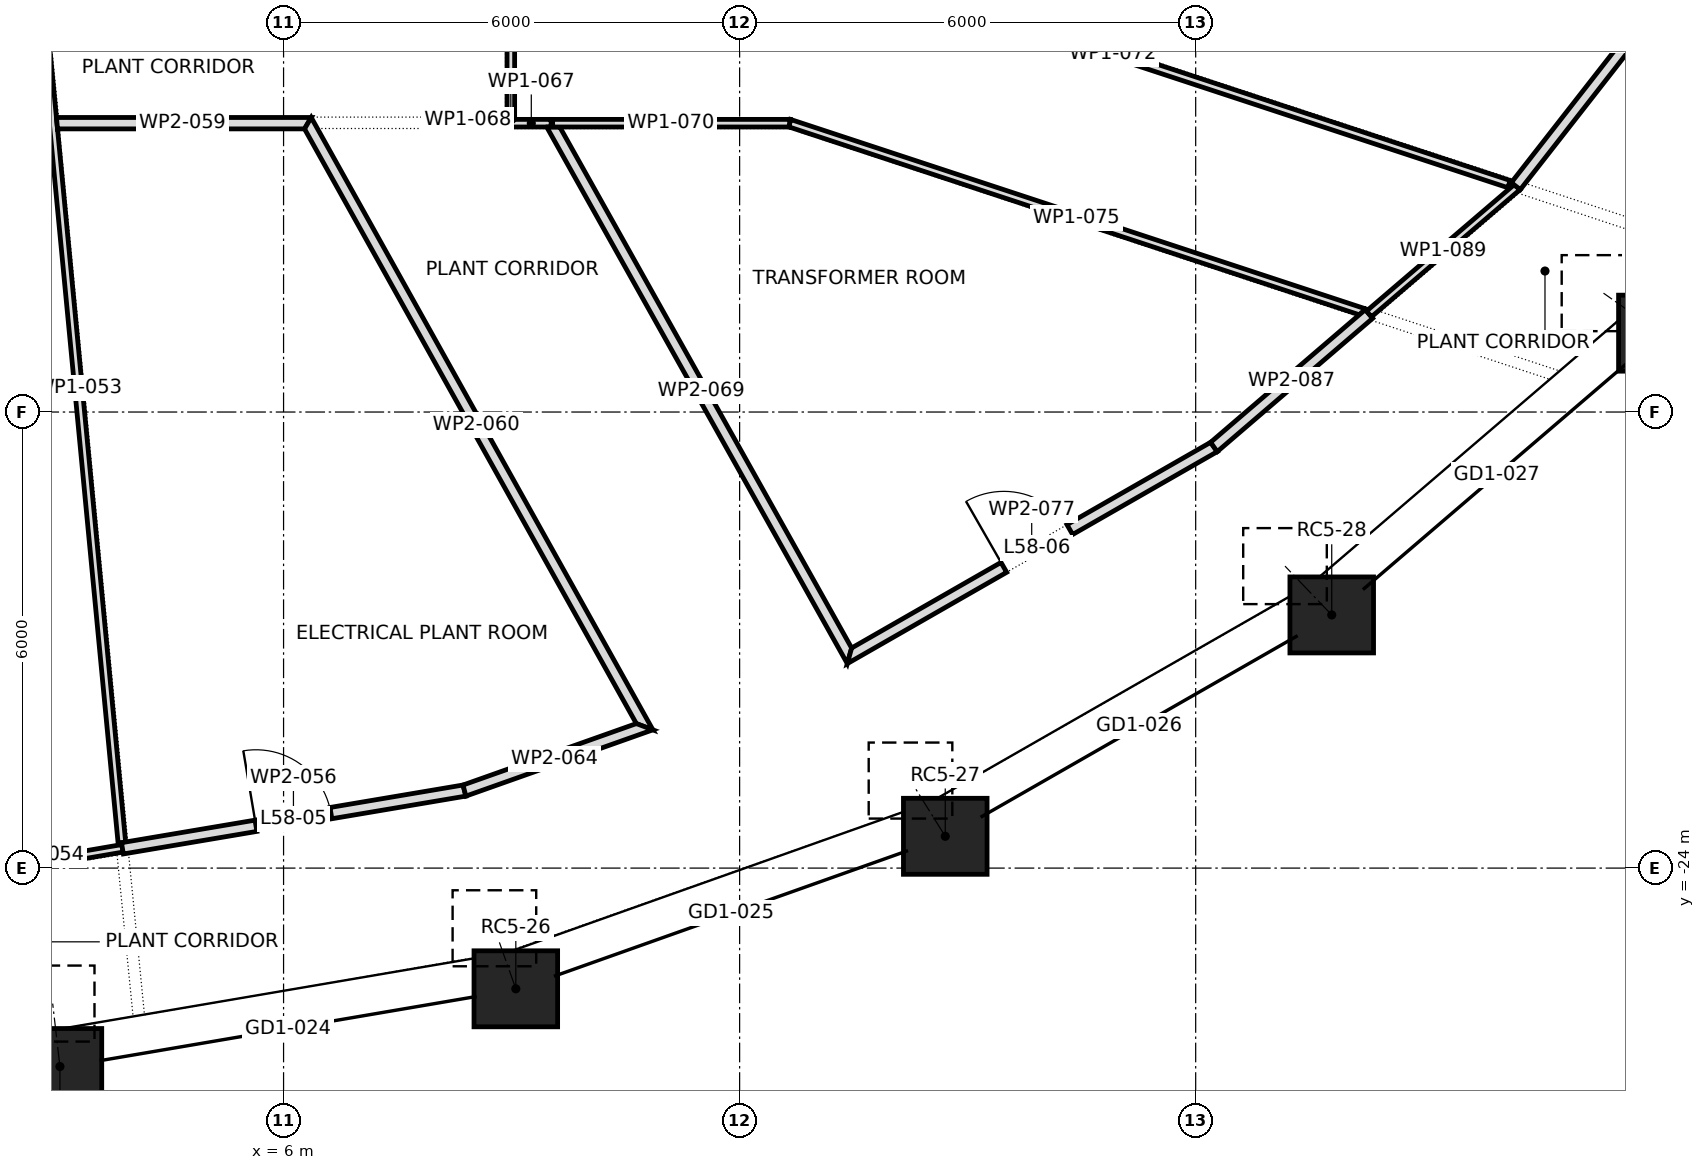
"""IFC4 building model, lengths in metres.
Left out: names, types, materials, properties, quantities, classifications, styles, units other than length and angle.
Written with IfcOpenShell. Run it as: python <this file> out.ifc"""

import sys

from ifc_helpers import new_model, si_unit, direction, frame, frame_2d, origin, origin_2d, place, context, subcontext, project, spatial, polyline, rectangle, outline, extrude, element, fill, save


model = new_model("IFC4")
c1 = context("Model", 3, precision=1e-05, world=origin(), true_north=direction((0.0, 1.0)))
c2 = subcontext(c1, "Body", "Model", "MODEL_VIEW")
j1 = project(units=[si_unit("LENGTHUNIT", "METRE"), si_unit("PLANEANGLEUNIT", "RADIAN")], contexts=[c1])
p1 = place(None, origin())
s1 = spatial("IfcSite", under=j1, at=p1, CompositionType="ELEMENT")
p2 = place(p1, origin())
s2 = spatial("IfcBuilding", under=s1, at=p2, CompositionType="ELEMENT")
p3 = place(p2, frame((0.0, 0.0, 250.9)))
s3 = spatial("IfcBuildingStorey", under=s2, at=p3, CompositionType="ELEMENT", Elevation=250.9)
p4 = place(p3, frame((3.058, -26.611, 0.078), z_axis=(-0.017979718295, 0.155977505007, 0.987596956082), x_axis=(-0.993421756162, -0.11451294418, 0.0)))
e1 = element("IfcColumn", 1, at=p4, inside=s3, PredefinedType="COLUMN", context=c2, shape_type="SweptSolid", body=[
    extrude(rectangle(XDim=1.1, YDim=1.0, at=origin_2d()), origin(), (0.0, 0.0, 1.0), 5.309),
])
p5 = place(p3, frame((9.056, -25.588, 0.079), z_axis=(-0.053067495482, 0.149959361151, 0.987266950184), x_axis=(-0.942712482292, -0.333606318481, 0.0)))
e2 = element("IfcColumn", 2, at=p5, inside=s3, PredefinedType="COLUMN", context=c2, shape_type="SweptSolid", body=[
    extrude(rectangle(XDim=1.1, YDim=1.0, at=origin_2d()), origin(), (0.0, 0.0, 1.0), 5.309),
])
p6 = place(p3, frame((14.705, -23.582, 0.081), z_axis=(-0.086092626008, 0.138152910538, 0.986661964939), x_axis=(-0.848695936688, -0.528881089707, 0.0)))
e3 = element("IfcColumn", 3, at=p6, inside=s3, PredefinedType="COLUMN", context=c2, shape_type="SweptSolid", body=[
    extrude(rectangle(XDim=1.1, YDim=1.0, at=origin_2d()), origin(), (0.0, 0.0, 1.0), 5.309),
])
p7 = place(p3, frame((19.79, -20.669, 0.083), z_axis=(-0.115812481815, 0.12096379157, 0.985877898213), x_axis=(-0.722319686129, -0.691559304059, 0.0)))
e4 = element("IfcColumn", 4, at=p7, inside=s3, PredefinedType="COLUMN", context=c2, shape_type="SweptSolid", body=[
    extrude(rectangle(XDim=1.1, YDim=1.0, at=origin_2d()), origin(), (0.0, 0.0, 1.0), 5.308),
])
p8 = place(p3, frame((24.114, -16.962, 0.086), z_axis=(-0.14102688006, 0.099169586892, 0.985026300226), x_axis=(-0.575215805529, -0.818001697473, 0.0)))
e5 = element("IfcColumn", 5, at=p8, inside=s3, PredefinedType="COLUMN", context=c2, shape_type="SweptSolid", body=[
    extrude(rectangle(XDim=1.1, YDim=1.0, at=origin_2d()), origin(), (0.0, 0.0, 1.0), 5.308),
])
p9 = place(p3, frame((2.73, -11.7, 0.0), z_axis=(0.0, 0.0, 1.0), x_axis=(0.095076842023, -0.995469936317, 0.0)))
e6 = element("IfcWall", 6, at=p9, inside=s3, PredefinedType="PARTITIONING", context=c2, shape_type="SweptSolid", body=[
    extrude(outline(polyline([(12.048, -0.05), (12.048, -0.049), (12.045, -0.004), (12.048, -0.003), (12.048, -0.003), (12.02, -0.005), (12.016, 0.05), (10.131, 0.05), (8.246, 0.05), (6.361, 0.05), (4.476, 0.05), (2.592, 0.05), (2.592, 0.049), (2.579, 0.05), (1.29, 0.05), (0.0, 0.05), (0.0, -0.05), (1.721, -0.05), (3.442, -0.05), (5.164, -0.05), (6.885, -0.05), (8.606, -0.05), (10.327, -0.05), (12.048, -0.05)])), origin(), (0.0, 0.0, 1.0), 5.1),
])
p10 = place(p3, frame((2.826, -23.921, 0.0), z_axis=(0.0, 0.0, 1.0), x_axis=(0.985630942271, 0.168913130449, 0.0)))
e7 = element("IfcWall", 7, at=p10, inside=s3, PredefinedType="PARTITIONING", context=c2, shape_type="SweptSolid", body=[
    extrude(outline(polyline([(1.07, 0.05), (0.009, 0.05), (0.0, -0.05), (1.07, -0.05), (1.07, 0.05)])), origin(), (0.0, 0.0, 1.0), 5.1),
])
p11 = place(p3, frame((3.88, -23.74, 0.0), z_axis=(0.0, 0.0, 1.0), x_axis=(0.986040852246, 0.166503566632, 0.0)))
e8 = element("IfcWall", 8, at=p11, inside=s3, PredefinedType="PARTITIONING", context=c2, shape_type="SweptSolid", body=[
    extrude(outline(polyline([(4.57, -0.075), (4.57, -0.074), (4.557, 0.075), (3.038, 0.075), (1.519, 0.075), (0.0, 0.075), (0.0, -0.075), (1.523, -0.075), (3.047, -0.075), (4.57, -0.075)])), origin(), (0.0, 0.0, 1.0), 5.1),
])
p12 = place(p11, frame((1.782, 0.0, 0.0)))
e9 = element("IfcOpeningElement", 9, at=p12, cuts=e8, PredefinedType="OPENING", context=c2, shape_type="SweptSolid", body=[
    extrude(rectangle(XDim=1.0, YDim=2.1, at=frame_2d((0.5, 1.05))), frame((0.0, 0.087, 0.0), z_axis=(0.0, -1.0, 0.0), x_axis=(1.0, 0.0, 0.0)), (0.0, 0.0, 1.0), 0.174),
])
p13 = place(p3, frame((6.364, -14.2, 0.0), z_axis=(0.0, 0.0, 1.0), x_axis=(-1.0, 0.0, 0.0)))
e10 = element("IfcWall", 10, at=p13, inside=s3, PredefinedType="PARTITIONING", context=c2, shape_type="SweptSolid", body=[
    extrude(outline(polyline([(3.352, -0.075), (3.352, -0.074), (3.338, 0.075), (1.713, 0.075), (0.088, 0.075), (0.044, 0.0), (0.0, -0.075), (1.676, -0.075), (3.352, -0.075)])), origin(), (0.0, 0.0, 1.0), 5.1),
])
p14 = place(p3, frame((6.299, -14.162, 0.0), z_axis=(0.0, 0.0, 1.0), x_axis=(0.487226307056, -0.873275744374, 0.0)))
e11 = element("IfcWall", 11, at=p14, inside=s3, PredefinedType="PARTITIONING", context=c2, shape_type="SweptSolid", body=[
    extrude(outline(polyline([(0.088, -0.075), (1.88, -0.075), (3.672, -0.075), (5.464, -0.075), (7.255, -0.075), (9.047, -0.075), (9.225, 0.075), (9.225, 0.075), (7.38, 0.075), (5.535, 0.075), (3.69, 0.075), (1.845, 0.075), (0.0, 0.075), (0.0, 0.075), (0.088, -0.075)])), origin(), (0.0, 0.0, 1.0), 5.1),
])
p15 = place(p3, frame((8.374, -22.982, 0.0), z_axis=(0.0, 0.0, 1.0), x_axis=(0.942556062192, 0.334048004971, 0.0)))
e12 = element("IfcWall", 12, at=p15, inside=s3, PredefinedType="PARTITIONING", context=c2, shape_type="SweptSolid", body=[
    extrude(outline(polyline([(0.0, -0.075), (1.305, -0.075), (2.61, -0.075), (2.432, 0.075), (0.013, 0.075), (0.0, -0.075)])), origin(), (0.0, 0.0, 1.0), 5.1),
])
p16 = place(p3, frame((8.94, -14.2, 0.0), z_axis=(0.0, 0.0, 1.0), x_axis=(1.0, 0.0, 0.0)))
e13 = element("IfcWall", 13, at=p16, inside=s3, PredefinedType="PARTITIONING", context=c2, shape_type="SweptSolid", body=[
    extrude(outline(polyline([(0.0, -0.05), (0.59, -0.05), (0.59, 0.05), (0.59, 0.05), (0.59, 0.05), (0.1, 0.05), (0.0, -0.05)])), origin(), (0.0, 0.0, 1.0), 5.1),
])
p17 = place(p3, frame((8.99, -12.954, 0.0), z_axis=(0.0, 0.0, 1.0), x_axis=(0.0, -1.0, 0.0)))
e14 = element("IfcWall", 14, at=p17, inside=s3, PredefinedType="PARTITIONING", context=c2, shape_type="SweptSolid", body=[
    extrude(outline(polyline([(1.296, -0.05), (1.296, -0.05), (1.196, 0.05), (0.0, 0.05), (0.073, -0.05), (1.296, -0.05)])), origin(), (0.0, 0.0, 1.0), 5.1),
])
p18 = place(p3, frame((9.528, -14.213, 0.0), z_axis=(0.0, 0.0, 1.0), x_axis=(0.488729226687, -0.872435523682, 0.0)))
e15 = element("IfcWall", 15, at=p18, inside=s3, PredefinedType="PARTITIONING", context=c2, shape_type="SweptSolid", body=[
    extrude(outline(polyline([(0.0, -0.075), (1.618, -0.075), (3.237, -0.075), (4.855, -0.075), (6.473, -0.075), (8.092, -0.075), (8.028, -0.012), (7.94, 0.075), (5.976, 0.075), (4.012, 0.075), (2.048, 0.075), (0.084, 0.075), (0.033, -0.016), (0.0, -0.075), (0.0, -0.075)])), origin(), (0.0, 0.0, 1.0), 5.1),
])
p19 = place(p3, frame((9.53, -14.2, 0.0), z_axis=(0.0, 0.0, 1.0), x_axis=(1.0, 0.0, 0.0)))
e16 = element("IfcWall", 16, at=p19, inside=s3, PredefinedType="PARTITIONING", context=c2, shape_type="SweptSolid", body=[
    extrude(outline(polyline([(0.0, -0.05), (1.561, -0.05), (3.122, -0.05), (3.138, 0.05), (3.138, 0.05), (1.569, 0.05), (0.0, 0.05), (0.0, -0.05)])), origin(), (0.0, 0.0, 1.0), 5.1),
])
p20 = place(p3, frame((11.7, -11.57, 0.0), z_axis=(0.0, 0.0, 1.0), x_axis=(0.949849374499, -0.312707796135, 0.0)))
e17 = element("IfcWall", 17, at=p20, inside=s3, PredefinedType="PARTITIONING", context=c2, shape_type="SweptSolid", body=[
    extrude(rectangle(XDim=10.972, YDim=0.1, at=frame_2d((5.486, 0.0))), origin(), (0.0, 0.0, 1.0), 5.1),
])
p21 = place(p3, frame((12.652, -14.198, 0.0), z_axis=(0.0, 0.0, 1.0), x_axis=(0.949797020895, -0.31286677532, 0.0)))
e18 = element("IfcWall", 18, at=p21, inside=s3, PredefinedType="PARTITIONING", context=c2, shape_type="SweptSolid", body=[
    extrude(outline(polyline([(0.016, -0.05), (1.99, -0.05), (3.965, -0.05), (5.939, -0.05), (7.913, -0.05), (7.967, 0.039), (8.002, 0.017), (8.002, 0.017), (7.988, 0.026), (8.002, 0.05), (8.002, 0.05), (6.402, 0.05), (4.802, 0.05), (3.201, 0.05), (1.601, 0.05), (0.0, 0.05), (0.008, 0.0), (0.016, -0.05), (0.016, -0.05), (0.016, -0.05)])), origin(), (0.0, 0.0, 1.0), 5.1),
])
p22 = place(p3, frame((13.379, -21.245, 0.0), z_axis=(0.0, 0.0, 1.0), x_axis=(0.867677390778, 0.497127695399, 0.0)))
e19 = element("IfcWall", 19, at=p22, inside=s3, PredefinedType="PARTITIONING", context=c2, shape_type="SweptSolid", body=[
    extrude(outline(polyline([(5.609, -0.075), (5.609, -0.074), (5.595, 0.075), (3.78, 0.075), (1.966, 0.075), (0.152, 0.075), (0.0, -0.075), (1.87, -0.075), (3.739, -0.075), (5.609, -0.075)])), origin(), (0.0, 0.0, 1.0), 5.1),
])
p23 = place(p22, frame((2.417, 0.0, 0.0)))
e20 = element("IfcOpeningElement", 20, at=p23, cuts=e19, PredefinedType="OPENING", context=c2, shape_type="SweptSolid", body=[
    extrude(rectangle(XDim=1.0, YDim=2.1, at=frame_2d((0.5, 1.05))), frame((0.0, 0.087, 0.0), z_axis=(0.0, -1.0, 0.0), x_axis=(1.0, 0.0, 0.0)), (0.0, 0.0, 1.0), 0.174),
])
p24 = place(p3, frame((18.235, -18.465, 0.0), z_axis=(0.0, 0.0, 1.0), x_axis=(0.758994351807, 0.651097207739, 0.0)))
e21 = element("IfcWall", 21, at=p24, inside=s3, PredefinedType="PARTITIONING", context=c2, shape_type="SweptSolid", body=[
    extrude(outline(polyline([(2.695, 0.075), (1.354, 0.075), (0.014, 0.075), (0.0, -0.075), (0.0, -0.075), (1.347, -0.075), (2.695, -0.075), (2.695, 0.075)])), origin(), (0.0, 0.0, 1.0), 5.1),
])
p25 = place(p3, frame((20.28, -16.71, 0.0), z_axis=(0.0, 0.0, 1.0), x_axis=(0.759557658446, 0.650439976859, 0.0)))
e22 = element("IfcWall", 22, at=p25, inside=s3, PredefinedType="PARTITIONING", context=c2, shape_type="SweptSolid", body=[
    extrude(outline(polyline([(2.575, -0.05), (2.575, -0.049), (2.555, 0.05), (1.292, 0.05), (0.028, 0.05), (0.0, 0.033), (0.0, -0.05), (1.288, -0.05), (2.575, -0.05)])), origin(), (0.0, 0.0, 1.0), 5.1),
])
p26 = place(p3, frame((22.211, -15.028, 0.0), z_axis=(0.0, 0.0, 1.0), x_axis=(0.61594223666, 0.787791318243, 0.0)))
e23 = element("IfcWall", 23, at=p26, inside=s3, PredefinedType="PARTITIONING", context=c2, shape_type="SweptSolid", body=[
    extrude(outline(polyline([(0.0, -0.075), (1.631, -0.075), (3.262, -0.075), (4.893, -0.075), (4.876, 0.075), (3.251, 0.075), (1.625, 0.075), (0.0, 0.075), (0.0, -0.075)])), origin(), (0.0, 0.0, 1.0), 5.1),
])
p27 = place(p12, origin())
e24 = element("IfcDoor", 24, at=p27, inside=s3, OperationType="SINGLE_SWING_RIGHT", PredefinedType="DOOR", context=c2, shape_type="SweptSolid", body=[
    extrude(rectangle(XDim=1.0, YDim=2.1, at=frame_2d((0.5, 1.05))), frame((0.0, 0.025, 0.0), z_axis=(0.0, -1.0, 0.0), x_axis=(1.0, 0.0, 0.0)), (0.0, 0.0, 1.0), 0.05),
])
fill(e9, e24)
p28 = place(p23, origin())
e25 = element("IfcDoor", 25, at=p28, inside=s3, OperationType="SINGLE_SWING_RIGHT", PredefinedType="DOOR", context=c2, shape_type="SweptSolid", body=[
    extrude(rectangle(XDim=1.0, YDim=2.1, at=frame_2d((0.5, 1.05))), frame((0.0, 0.025, 0.0), z_axis=(0.0, -1.0, 0.0), x_axis=(1.0, 0.0, 0.0)), (0.0, 0.0, 1.0), 0.05),
])
fill(e20, e25)
save(model, sys.argv[1])
